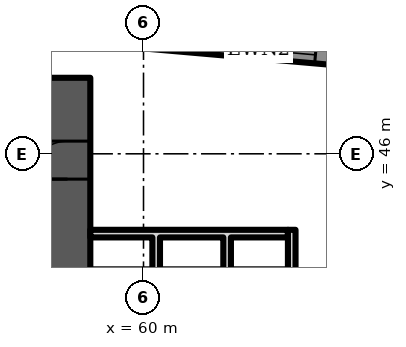
"""IFC4 building model, lengths in metres.
Left out: names, types, materials, properties, quantities, classifications, styles, units other than length and angle.
Written with IfcOpenShell. Run it as: python <this file> out.ifc"""

import sys

from ifc_helpers import new_model, si_unit, direction, frame, frame_2d, origin, place, context, subcontext, project, spatial, polyline, rectangle, outline, extrude, element, fill, save


model = new_model("IFC4")
c1 = context("Model", 3, precision=1e-05, world=origin(), true_north=direction((0.0, 1.0)))
c2 = subcontext(c1, "Body", "Model", "MODEL_VIEW")
j1 = project(units=[si_unit("LENGTHUNIT", "METRE"), si_unit("PLANEANGLEUNIT", "RADIAN")], contexts=[c1])
p1 = place(None, origin())
s1 = spatial("IfcSite", under=j1, at=p1, CompositionType="ELEMENT")
p2 = place(p1, origin())
s2 = spatial("IfcBuilding", under=s1, at=p2, CompositionType="ELEMENT")
p3 = place(p2, frame((0.0, 0.0, 15.0)))
s3 = spatial("IfcBuildingStorey", under=s2, at=p3, CompositionType="ELEMENT", Elevation=15.0)
p4 = place(p3, frame((66.058, 48.469, 0.0), z_axis=(0.0, 0.0, 1.0), x_axis=(-0.996195, 0.087158, 0.0)))
e1 = element("IfcWall", 1, at=p4, inside=s3, PredefinedType="SOLIDWALL", context=c2, shape_type="SweptSolid", body=[
    extrude(rectangle(XDim=6.081, YDim=0.45, at=frame_2d((3.041, 0.0))), origin(), (0.0, 0.0, 1.0), 6.2),
])
p5 = place(p4, frame((1.541, 0.0, 1.0)))
e2 = element("IfcOpeningElement", 2, at=p5, cuts=e1, PredefinedType="OPENING", context=c2, shape_type="SweptSolid", body=[
    extrude(rectangle(XDim=3.0, YDim=4.2, at=frame_2d((1.5, 2.1))), frame((0.0, 0.235, 0.0), z_axis=(0.0, -1.0, 0.0), x_axis=(1.0, 0.0, 0.0)), (0.0, 0.0, 1.0), 0.47),
])
p6 = place(p3, frame((58.0, 35.2, 0.0), z_axis=(0.0, 0.0, 1.0), x_axis=(0.0, 1.0, 0.0)))
e3 = element("IfcWall", 3, at=p6, inside=s3, PredefinedType="SHEAR", context=c2, shape_type="SweptSolid", body=[
    extrude(rectangle(XDim=12.8, YDim=1.2, at=frame_2d((6.4, 0.0))), origin(), (0.0, 0.0, 1.0), 6.2),
])
p7 = place(p6, frame((10.134, 0.0, 0.0)))
e4 = element("IfcOpeningElement", 4, at=p7, cuts=e3, PredefinedType="OPENING", context=c2, shape_type="SweptSolid", body=[
    extrude(rectangle(XDim=1.0, YDim=2.1, at=frame_2d((0.5, 1.05))), frame((0.0, 0.61, 0.0), z_axis=(0.0, -1.0, 0.0), x_axis=(1.0, 0.0, 0.0)), (0.0, 0.0, 1.0), 1.22),
])
p8 = place(p6, frame((3.2, 0.0, 0.0)))
e5 = element("IfcOpeningElement", 5, at=p8, cuts=e3, PredefinedType="OPENING", context=c2, shape_type="SweptSolid", body=[
    extrude(rectangle(XDim=1.1, YDim=2.1, at=frame_2d((0.55, 1.05))), frame((0.0, 0.61, 0.0), z_axis=(0.0, -1.0, 0.0), x_axis=(1.0, 0.0, 0.0)), (0.0, 0.0, 1.0), 1.22),
])
p9 = place(p3, frame((0.0, 0.0, -0.0)))
e6 = element("IfcWall", 6, at=p9, inside=s3, PredefinedType="PARTITIONING", context=c2, shape_type="SweptSolid", body=[
    extrude(outline(polyline([(60.433, 40.8), (60.233, 40.8), (60.233, 43.8), (58.6, 43.8), (58.6, 44.0), (63.8, 44.0), (63.8, 43.8), (62.3, 43.8), (62.3, 40.8), (62.1, 40.8), (62.1, 43.8), (60.433, 43.8), (60.433, 40.8)])), origin(), (0.0, 0.0, 1.0), 6.2),
])
p10 = place(p3, frame((63.9, 40.6, 0.0), z_axis=(0.0, 0.0, 1.0), x_axis=(0.0, 1.0, 0.0)))
e7 = element("IfcWall", 7, at=p10, inside=s3, PredefinedType="PARTITIONING", context=c2, shape_type="SweptSolid", body=[
    extrude(rectangle(XDim=3.4, YDim=0.2, at=frame_2d((1.7, 0.0))), origin(), (0.0, 0.0, 1.0), 6.2),
])
p11 = place(p5, origin())
e8 = element("IfcWindow", 8, at=p11, inside=s3, PartitioningType="SINGLE_PANEL", PredefinedType="WINDOW", context=c2, shape_type="SweptSolid", body=[
    extrude(rectangle(XDim=3.0, YDim=4.2, at=frame_2d((1.5, 2.1))), frame((0.0, 0.105, 0.0), z_axis=(0.0, -1.0, 0.0), x_axis=(1.0, 0.0, 0.0)), (0.0, 0.0, 1.0), 0.06),
])
fill(e2, e8)
p12 = place(p7, origin())
e9 = element("IfcDoor", 9, at=p12, inside=s3, OperationType="SINGLE_SWING_LEFT", PredefinedType="DOOR", context=c2, shape_type="SweptSolid", body=[
    extrude(rectangle(XDim=1.0, YDim=2.1, at=frame_2d((0.5, 1.05))), frame((0.0, 0.6, 0.0), z_axis=(0.0, -1.0, 0.0), x_axis=(1.0, 0.0, 0.0)), (0.0, 0.0, 1.0), 1.199),
])
fill(e4, e9)
save(model, sys.argv[1])
